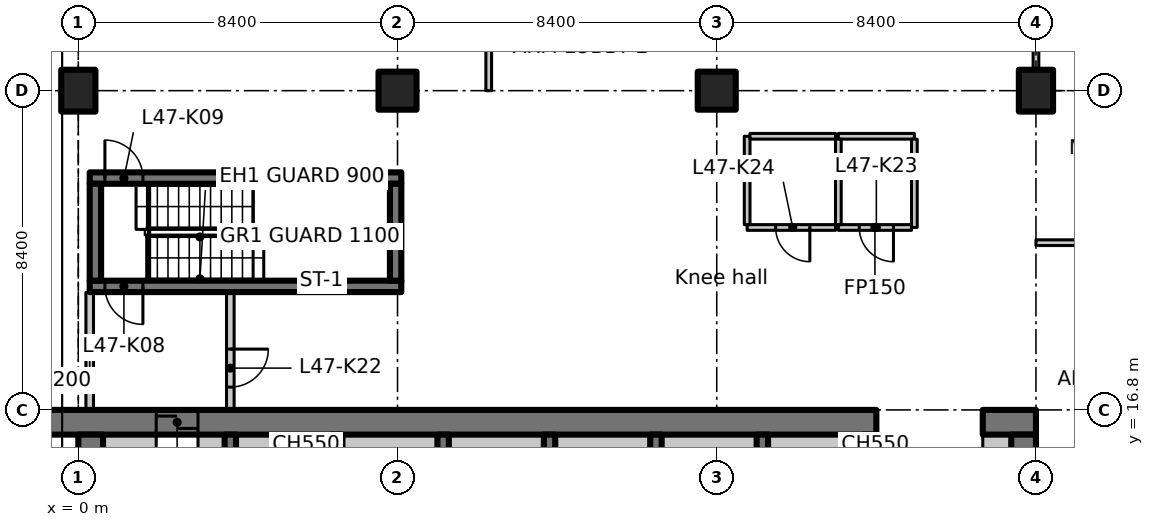
"""IFC4 building model, lengths in metres.
Left out: names, types, materials, properties, quantities, classifications, styles, units other than length and angle.
Written with IfcOpenShell. Run it as: python <this file> out.ifc"""

import sys

from ifc_helpers import new_model, si_unit, direction, frame, frame_2d, origin, origin_2d, place, context, subcontext, project, spatial, polyline, rectangle, outline, extrude, element, fill, save


model = new_model("IFC4")
c1 = context("Model", 3, precision=1e-05, world=origin(), true_north=direction((0.0, 1.0)))
c2 = subcontext(c1, "Body", "Model", "MODEL_VIEW")
j1 = project(units=[si_unit("LENGTHUNIT", "METRE"), si_unit("PLANEANGLEUNIT", "RADIAN")], contexts=[c1])
p1 = place(None, origin())
s1 = spatial("IfcSite", under=j1, at=p1, CompositionType="ELEMENT")
p2 = place(p1, origin())
s2 = spatial("IfcBuilding", under=s1, at=p2, CompositionType="ELEMENT")
p3 = place(p2, frame((0.0, 0.0, 188.4)))
s3 = spatial("IfcBuildingStorey", under=s2, at=p3, CompositionType="ELEMENT", Elevation=188.4)
p4 = place(p3, frame((0.0, 25.2, 0.0), z_axis=(0.0, 0.0, 1.0), x_axis=(1.0, 0.0, 0.0)))
e1 = element("IfcColumn", 1, at=p4, inside=s3, PredefinedType="COLUMN", context=c2, shape_type="SweptSolid", body=[
    extrude(rectangle(XDim=0.9, YDim=1.1, at=origin_2d()), origin(), (0.0, 0.0, 1.0), 3.35),
])
for number, where, z_axis, x_axis in (
    (2, (8.4, 25.2, 0.0), (0.0, 0.0, 1.0), (1.0, 0.0, 0.0)),
    (3, (16.8, 25.2, 0.0), (0.0, 0.0, 1.0), (1.0, 0.0, 0.0)),
):
    element("IfcColumn", number, at=place(p3, frame(where, z_axis=z_axis, x_axis=x_axis)), inside=s3, PredefinedType="COLUMN", context=c2, shape_type="SweptSolid", body=[
        extrude(rectangle(XDim=1.0, YDim=1.0, at=origin_2d()), origin(), (0.0, 0.0, 1.0), 3.35),
    ])
p5 = place(p3, frame((25.2, 25.2, 0.0), z_axis=(0.0, 0.0, 1.0), x_axis=(1.0, 0.0, 0.0)))
e4 = element("IfcColumn", 4, at=p5, inside=s3, PredefinedType="COLUMN", context=c2, shape_type="SweptSolid", body=[
    extrude(rectangle(XDim=0.9, YDim=1.1, at=origin_2d()), origin(), (0.0, 0.0, 1.0), 3.35),
])
p6 = place(p3, frame((-1.1, 16.475, 0.0), z_axis=(0.0, 0.0, 1.0), x_axis=(1.0, 0.0, 0.0)))
e5 = element("IfcWall", 5, at=p6, inside=s3, PredefinedType="SHEAR", context=c2, shape_type="SweptSolid", body=[
    extrude(rectangle(XDim=22.1, YDim=0.65, at=frame_2d((11.05, 0.0))), origin(), (0.0, 0.0, 1.0), 3.35),
])
p7 = place(p6, frame((3.15, 0.0, 0.0)))
e6 = element("IfcOpeningElement", 6, at=p7, cuts=e5, PredefinedType="OPENING", context=c2, shape_type="SweptSolid", body=[
    extrude(rectangle(XDim=1.1, YDim=2.3, at=frame_2d((0.55, 1.15))), frame((0.0, 0.335, 0.0), z_axis=(0.0, -1.0, 0.0), x_axis=(1.0, 0.0, 0.0)), (0.0, 0.0, 1.0), 0.67),
])
p8 = place(p3, frame((23.8, 16.475, 0.0), z_axis=(0.0, 0.0, 1.0), x_axis=(1.0, 0.0, 0.0)))
e7 = element("IfcWall", 7, at=p8, inside=s3, PredefinedType="SHEAR", context=c2, shape_type="SweptSolid", body=[
    extrude(rectangle(XDim=1.4, YDim=0.65, at=frame_2d((0.7, 0.0))), origin(), (0.0, 0.0, 1.0), 3.35),
])
p9 = place(p3, frame((0.325, 7.286, 0.0), z_axis=(0.0, 0.0, 1.0), x_axis=(0.0, 1.0, 0.0)))
e8 = element("IfcWall", 8, at=p9, inside=s3, PredefinedType="SHEAR", context=c2, shape_type="SweptSolid", body=[
    extrude(rectangle(XDim=8.864, YDim=0.65, at=frame_2d((4.432, 0.0))), origin(), (0.0, 0.0, 1.0), 3.35),
])
p10 = place(p3, frame((24.875, 12.6, 0.0), z_axis=(0.0, 0.0, 1.0), x_axis=(0.0, 1.0, 0.0)))
e9 = element("IfcWall", 9, at=p10, inside=s3, PredefinedType="SHEAR", context=c2, shape_type="SweptSolid", body=[
    extrude(rectangle(XDim=3.55, YDim=0.65, at=frame_2d((1.775, 0.0))), origin(), (0.0, 0.0, 1.0), 3.35),
])
p11 = place(p3, frame((0.65, 15.875, 0.0), z_axis=(0.0, 0.0, 1.0), x_axis=(1.0, 0.0, 0.0)))
e10 = element("IfcWall", 10, at=p11, inside=s3, PredefinedType="PARTITIONING", context=c2, shape_type="SweptSolid", body=[
    extrude(rectangle(XDim=1.4, YDim=0.55, at=frame_2d((0.7, 0.0))), origin(), (0.0, 0.0, 1.0), 3.35),
])
p12 = place(p3, frame((23.8, 15.875, 0.0), z_axis=(0.0, 0.0, 1.0), x_axis=(1.0, 0.0, 0.0)))
e11 = element("IfcWall", 11, at=p12, inside=s3, PredefinedType="PARTITIONING", context=c2, shape_type="SweptSolid", body=[
    extrude(rectangle(XDim=0.75, YDim=0.55, at=frame_2d((0.375, 0.0))), origin(), (0.0, 0.0, 1.0), 3.35),
])
for number, where, z_axis, x_axis in (
    (12, (4.0, 12.95, 0.0), (0.0, 0.0, 1.0), (0.0, 1.0, 0.0)),
    (13, (6.8, 12.95, 0.0), (0.0, 0.0, 1.0), (0.0, 1.0, 0.0)),
    (14, (9.6, 12.95, 0.0), (0.0, 0.0, 1.0), (0.0, 1.0, 0.0)),
    (15, (12.4, 12.95, 0.0), (0.0, 0.0, 1.0), (0.0, 1.0, 0.0)),
    (16, (15.2, 12.95, 0.0), (0.0, 0.0, 1.0), (0.0, 1.0, 0.0)),
    (17, (18.0, 12.95, 0.0), (0.0, 0.0, 1.0), (0.0, 1.0, 0.0)),
    (18, (20.8, 12.95, 0.0), (0.0, 0.0, 1.0), (0.0, 1.0, 0.0)),
):
    element("IfcWall", number, at=place(p3, frame(where, z_axis=z_axis, x_axis=x_axis)), inside=s3, PredefinedType="SHEAR", context=c2, shape_type="SweptSolid", body=[
        extrude(rectangle(XDim=3.2, YDim=0.3, at=frame_2d((1.6, 0.0))), origin(), (0.0, 0.0, 1.0), 3.35),
    ])
p13 = place(p3, frame((8.5, 20.05, 0.0), z_axis=(0.0, 0.0, 1.0), x_axis=(-1.0, 0.0, 0.0)))
e19 = element("IfcWall", 19, at=p13, inside=s3, PredefinedType="SHEAR", context=c2, shape_type="SweptSolid", body=[
    extrude(rectangle(XDim=8.2, YDim=0.3, at=frame_2d((4.1, 0.0))), origin(), (0.0, 0.0, 1.0), 3.35),
])
p14 = place(p13, frame((6.8, 0.0, 0.0)))
e20 = element("IfcOpeningElement", 20, at=p14, cuts=e19, PredefinedType="OPENING", context=c2, shape_type="SweptSolid", body=[
    extrude(rectangle(XDim=1.0, YDim=2.1, at=frame_2d((0.5, 1.05))), frame((0.0, 0.16, 0.0), z_axis=(0.0, -1.0, 0.0), x_axis=(1.0, 0.0, 0.0)), (0.0, 0.0, 1.0), 0.32),
])
p15 = place(p3, frame((0.3, 22.9, 0.0), z_axis=(0.0, 0.0, 1.0), x_axis=(1.0, 0.0, 0.0)))
e21 = element("IfcWall", 21, at=p15, inside=s3, PredefinedType="SHEAR", context=c2, shape_type="SweptSolid", body=[
    extrude(rectangle(XDim=8.2, YDim=0.3, at=frame_2d((4.1, 0.0))), origin(), (0.0, 0.0, 1.0), 3.35),
])
p16 = place(p15, frame((0.4, 0.0, 0.0)))
e22 = element("IfcOpeningElement", 22, at=p16, cuts=e21, PredefinedType="OPENING", context=c2, shape_type="SweptSolid", body=[
    extrude(rectangle(XDim=1.0, YDim=2.1, at=frame_2d((0.5, 1.05))), frame((0.0, 0.16, 0.0), z_axis=(0.0, -1.0, 0.0), x_axis=(1.0, 0.0, 0.0)), (0.0, 0.0, 1.0), 0.32),
])
for number, where, z_axis, x_axis in (
    (23, (0.45, 20.2, 0.0), (0.0, 0.0, 1.0), (0.0, 1.0, 0.0)),
    (24, (8.35, 20.2, 0.0), (0.0, 0.0, 1.0), (0.0, 1.0, 0.0)),
):
    element("IfcWall", number, at=place(p3, frame(where, z_axis=z_axis, x_axis=x_axis)), inside=s3, PredefinedType="SHEAR", context=c2, shape_type="SweptSolid", body=[
        extrude(rectangle(XDim=2.55, YDim=0.3, at=frame_2d((1.275, 0.0))), origin(), (0.0, 0.0, 1.0), 3.35),
    ])
p17 = place(p3, frame((0.3, 16.812, 0.0), z_axis=(0.0, 0.0, 1.0), x_axis=(0.0, 1.0, 0.0)))
e25 = element("IfcWall", 25, at=p17, inside=s3, PredefinedType="PARTITIONING", context=c2, shape_type="SweptSolid", body=[
    extrude(rectangle(XDim=3.076, YDim=0.2, at=frame_2d((1.538, 0.0))), origin(), (0.0, 0.0, 1.0), 2.98),
])
p18 = place(p3, frame((4.0, 19.888, 0.0), z_axis=(0.0, 0.0, 1.0), x_axis=(0.0, -1.0, 0.0)))
e26 = element("IfcWall", 26, at=p18, inside=s3, PredefinedType="PARTITIONING", context=c2, shape_type="SweptSolid", body=[
    extrude(rectangle(XDim=3.076, YDim=0.2, at=frame_2d((1.538, 0.0))), origin(), (0.0, 0.0, 1.0), 3.35),
])
p19 = place(p18, frame((1.488, 0.0, 0.0)))
e27 = element("IfcOpeningElement", 27, at=p19, cuts=e26, PredefinedType="OPENING", context=c2, shape_type="SweptSolid", body=[
    extrude(rectangle(XDim=1.0, YDim=2.1, at=frame_2d((0.5, 1.05))), frame((0.0, 0.11, 0.0), z_axis=(0.0, -1.0, 0.0), x_axis=(1.0, 0.0, 0.0)), (0.0, 0.0, 1.0), 0.22),
])
p20 = place(p3, frame((20.0, 24.0, 0.0), z_axis=(0.0, 0.0, 1.0), x_axis=(1.0, 0.0, 0.0)))
e28 = element("IfcWall", 28, at=p20, inside=s3, PredefinedType="PARTITIONING", context=c2, shape_type="SweptSolid", body=[
    extrude(rectangle(XDim=2.0, YDim=0.15, at=frame_2d((1.0, 0.0))), origin(), (0.0, 0.0, 1.0), 3.35),
])
p21 = place(p3, frame((22.0, 23.925, 0.0), z_axis=(0.0, 0.0, 1.0), x_axis=(0.0, -1.0, 0.0)))
e29 = element("IfcWall", 29, at=p21, inside=s3, PredefinedType="PARTITIONING", context=c2, shape_type="SweptSolid", body=[
    extrude(rectangle(XDim=2.325, YDim=0.15, at=frame_2d((1.163, 0.0))), origin(), (0.0, 0.0, 1.0), 3.35),
])
p22 = place(p3, frame((21.925, 21.6, 0.0), z_axis=(0.0, 0.0, 1.0), x_axis=(-1.0, 0.0, 0.0)))
e30 = element("IfcWall", 30, at=p22, inside=s3, PredefinedType="PARTITIONING", context=c2, shape_type="SweptSolid", body=[
    extrude(rectangle(XDim=1.925, YDim=0.15, at=frame_2d((0.962, 0.0))), origin(), (0.0, 0.0, 1.0), 3.35),
])
p23 = place(p22, frame((0.475, 0.0, 0.0)))
e31 = element("IfcOpeningElement", 31, at=p23, cuts=e30, PredefinedType="OPENING", context=c2, shape_type="SweptSolid", body=[
    extrude(rectangle(XDim=0.9, YDim=2.1, at=frame_2d((0.45, 1.05))), frame((0.0, 0.085, 0.0), z_axis=(0.0, -1.0, 0.0), x_axis=(1.0, 0.0, 0.0)), (0.0, 0.0, 1.0), 0.17),
])
p24 = place(p3, frame((20.0, 21.675, 0.0), z_axis=(0.0, 0.0, 1.0), x_axis=(0.0, 1.0, 0.0)))
e32 = element("IfcWall", 32, at=p24, inside=s3, PredefinedType="PARTITIONING", context=c2, shape_type="SweptSolid", body=[
    extrude(rectangle(XDim=2.25, YDim=0.15, at=frame_2d((1.125, 0.0))), origin(), (0.0, 0.0, 1.0), 3.35),
])
p25 = place(p3, frame((19.925, 21.6, 0.0), z_axis=(0.0, 0.0, 1.0), x_axis=(-1.0, 0.0, 0.0)))
e33 = element("IfcWall", 33, at=p25, inside=s3, PredefinedType="PARTITIONING", context=c2, shape_type="SweptSolid", body=[
    extrude(rectangle(XDim=2.325, YDim=0.15, at=frame_2d((1.163, 0.0))), origin(), (0.0, 0.0, 1.0), 3.35),
])
p26 = place(p25, frame((0.675, 0.0, 0.0)))
e34 = element("IfcOpeningElement", 34, at=p26, cuts=e33, PredefinedType="OPENING", context=c2, shape_type="SweptSolid", body=[
    extrude(rectangle(XDim=0.9, YDim=2.1, at=frame_2d((0.45, 1.05))), frame((0.0, 0.085, 0.0), z_axis=(0.0, -1.0, 0.0), x_axis=(1.0, 0.0, 0.0)), (0.0, 0.0, 1.0), 0.17),
])
p27 = place(p3, frame((17.6, 21.675, 0.0), z_axis=(0.0, 0.0, 1.0), x_axis=(0.0, 1.0, 0.0)))
e35 = element("IfcWall", 35, at=p27, inside=s3, PredefinedType="PARTITIONING", context=c2, shape_type="SweptSolid", body=[
    extrude(rectangle(XDim=2.325, YDim=0.15, at=frame_2d((1.163, 0.0))), origin(), (0.0, 0.0, 1.0), 3.35),
])
p28 = place(p3, frame((17.675, 24.0, 0.0), z_axis=(0.0, 0.0, 1.0), x_axis=(1.0, 0.0, 0.0)))
e36 = element("IfcWall", 36, at=p28, inside=s3, PredefinedType="PARTITIONING", context=c2, shape_type="SweptSolid", body=[
    extrude(rectangle(XDim=2.25, YDim=0.15, at=frame_2d((1.125, 0.0))), origin(), (0.0, 0.0, 1.0), 3.35),
])
p29 = place(p3, frame((3.15, 15.875, 0.0), z_axis=(0.0, 0.0, 1.0), x_axis=(1.0, 0.0, 0.0)))
e37 = element("IfcWall", 37, at=p29, inside=s3, PredefinedType="PARTITIONING", context=c2, shape_type="SweptSolid", body=[
    extrude(rectangle(XDim=0.7, YDim=0.55, at=frame_2d((0.35, 0.0))), origin(), (0.0, 0.0, 1.0), 3.35),
])
for number, where, z_axis, x_axis in (
    (38, (4.15, 15.875, 0.0), (0.0, 0.0, 1.0), (1.0, 0.0, 0.0)),
    (39, (6.95, 15.875, 0.0), (0.0, 0.0, 1.0), (1.0, 0.0, 0.0)),
    (40, (9.75, 15.875, 0.0), (0.0, 0.0, 1.0), (1.0, 0.0, 0.0)),
    (41, (12.55, 15.875, 0.0), (0.0, 0.0, 1.0), (1.0, 0.0, 0.0)),
    (42, (15.35, 15.875, 0.0), (0.0, 0.0, 1.0), (1.0, 0.0, 0.0)),
    (43, (18.15, 15.875, 0.0), (0.0, 0.0, 1.0), (1.0, 0.0, 0.0)),
):
    element("IfcWall", number, at=place(p3, frame(where, z_axis=z_axis, x_axis=x_axis)), inside=s3, PredefinedType="PARTITIONING", context=c2, shape_type="SweptSolid", body=[
        extrude(rectangle(XDim=2.5, YDim=0.55, at=frame_2d((1.25, 0.0))), origin(), (0.0, 0.0, 1.0), 3.35),
    ])
p30 = place(p3, frame((20.95, 15.875, 0.0), z_axis=(0.0, 0.0, 1.0), x_axis=(1.0, 0.0, 0.0)))
e44 = element("IfcWall", 44, at=p30, inside=s3, PredefinedType="PARTITIONING", context=c2, shape_type="SweptSolid", body=[
    extrude(rectangle(XDim=0.05, YDim=0.55, at=frame_2d((0.025, 0.0))), origin(), (0.0, 0.0, 1.0), 3.35),
])
p31 = place(p3, frame((25.2, 21.2, 0.0), z_axis=(0.0, 0.0, 1.0), x_axis=(1.0, 0.0, 0.0)))
e45 = element("IfcWall", 45, at=p31, inside=s3, PredefinedType="PARTITIONING", context=c2, shape_type="SweptSolid", body=[
    extrude(rectangle(XDim=4.2, YDim=0.15, at=frame_2d((2.1, 0.0))), origin(), (0.0, 0.0, 1.0), 3.33),
])
p32 = place(p3, frame((25.2, 31.0, 0.0), z_axis=(0.0, 0.0, 1.0), x_axis=(0.0, -1.0, 0.0)))
e46 = element("IfcWall", 46, at=p32, inside=s3, PredefinedType="PARTITIONING", context=c2, shape_type="SweptSolid", body=[
    extrude(outline(polyline([(0.0, 0.0), (5.23, 0.0), (5.23, 2.98), (0.0, 2.98), (0.0, 0.0)])), frame((0.0, 0.075, 0.0), z_axis=(0.0, -1.0, 0.0), x_axis=(1.0, 0.0, 0.0)), (0.0, 0.0, 1.0), 0.15),
])
p33 = place(p32, frame((2.03, 0.0, 0.0)))
e47 = element("IfcOpeningElement", 47, at=p33, cuts=e46, PredefinedType="OPENING", context=c2, shape_type="SweptSolid", body=[
    extrude(rectangle(XDim=1.1, YDim=2.1, at=frame_2d((0.55, 1.05))), frame((0.0, 0.085, 0.0), z_axis=(0.0, -1.0, 0.0), x_axis=(1.0, 0.0, 0.0)), (0.0, 0.0, 1.0), 0.17),
])
p34 = place(p3, frame((10.8, 25.2, 0.0), z_axis=(0.0, 0.0, 1.0), x_axis=(0.0, 1.0, 0.0)))
e48 = element("IfcWall", 48, at=p34, inside=s3, PredefinedType="PARTITIONING", context=c2, shape_type="SweptSolid", body=[
    extrude(rectangle(XDim=8.4, YDim=0.15, at=frame_2d((4.2, 0.0))), origin(), (0.0, 0.0, 1.0), 3.33),
])
p35 = place(p34, frame((3.3, 0.0, 0.0)))
e49 = element("IfcOpeningElement", 49, at=p35, cuts=e48, PredefinedType="OPENING", context=c2, shape_type="SweptSolid", body=[
    extrude(rectangle(XDim=1.6, YDim=2.1, at=frame_2d((0.8, 1.05))), frame((0.0, 0.085, 0.0), z_axis=(0.0, -1.0, 0.0), x_axis=(1.0, 0.0, 0.0)), (0.0, 0.0, 1.0), 0.17),
])
p36 = place(p7, origin())
e50 = element("IfcDoor", 50, at=p36, inside=s3, OperationType="SLIDING_TO_LEFT", PredefinedType="DOOR", context=c2, shape_type="SweptSolid", body=[
    extrude(rectangle(XDim=1.1, YDim=2.3, at=frame_2d((0.55, 1.15))), frame((0.0, 0.025, 0.0), z_axis=(0.0, -1.0, 0.0), x_axis=(1.0, 0.0, 0.0)), (0.0, 0.0, 1.0), 0.05),
])
fill(e6, e50)
p37 = place(p14, origin())
e51 = element("IfcDoor", 51, at=p37, inside=s3, OperationType="SINGLE_SWING_RIGHT", PredefinedType="DOOR", context=c2, shape_type="SweptSolid", body=[
    extrude(rectangle(XDim=1.0, YDim=2.1, at=frame_2d((0.5, 1.05))), frame((0.0, 0.025, 0.0), z_axis=(0.0, -1.0, 0.0), x_axis=(1.0, 0.0, 0.0)), (0.0, 0.0, 1.0), 0.05),
])
fill(e20, e51)
p38 = place(p16, origin())
e52 = element("IfcDoor", 52, at=p38, inside=s3, OperationType="SINGLE_SWING_LEFT", PredefinedType="DOOR", context=c2, shape_type="SweptSolid", body=[
    extrude(rectangle(XDim=1.0, YDim=2.1, at=frame_2d((0.5, 1.05))), frame((0.0, 0.025, 0.0), z_axis=(0.0, -1.0, 0.0), x_axis=(1.0, 0.0, 0.0)), (0.0, 0.0, 1.0), 0.05),
])
fill(e22, e52)
p39 = place(p19, origin())
e53 = element("IfcDoor", 53, at=p39, inside=s3, OperationType="SINGLE_SWING_RIGHT", PredefinedType="DOOR", context=c2, shape_type="SweptSolid", body=[
    extrude(rectangle(XDim=1.0, YDim=2.1, at=frame_2d((0.5, 1.05))), frame((0.0, 0.025, 0.0), z_axis=(0.0, -1.0, 0.0), x_axis=(1.0, 0.0, 0.0)), (0.0, 0.0, 1.0), 0.05),
])
fill(e27, e53)
p40 = place(p23, origin())
e54 = element("IfcDoor", 54, at=p40, inside=s3, OperationType="SINGLE_SWING_LEFT", PredefinedType="DOOR", context=c2, shape_type="SweptSolid", body=[
    extrude(rectangle(XDim=0.9, YDim=2.1, at=frame_2d((0.45, 1.05))), frame((0.0, 0.025, 0.0), z_axis=(0.0, -1.0, 0.0), x_axis=(1.0, 0.0, 0.0)), (0.0, 0.0, 1.0), 0.05),
])
fill(e31, e54)
p41 = place(p26, origin())
e55 = element("IfcDoor", 55, at=p41, inside=s3, OperationType="SINGLE_SWING_RIGHT", PredefinedType="DOOR", context=c2, shape_type="SweptSolid", body=[
    extrude(rectangle(XDim=0.9, YDim=2.1, at=frame_2d((0.45, 1.05))), frame((0.0, 0.025, 0.0), z_axis=(0.0, -1.0, 0.0), x_axis=(1.0, 0.0, 0.0)), (0.0, 0.0, 1.0), 0.05),
])
fill(e34, e55)
save(model, sys.argv[1])
